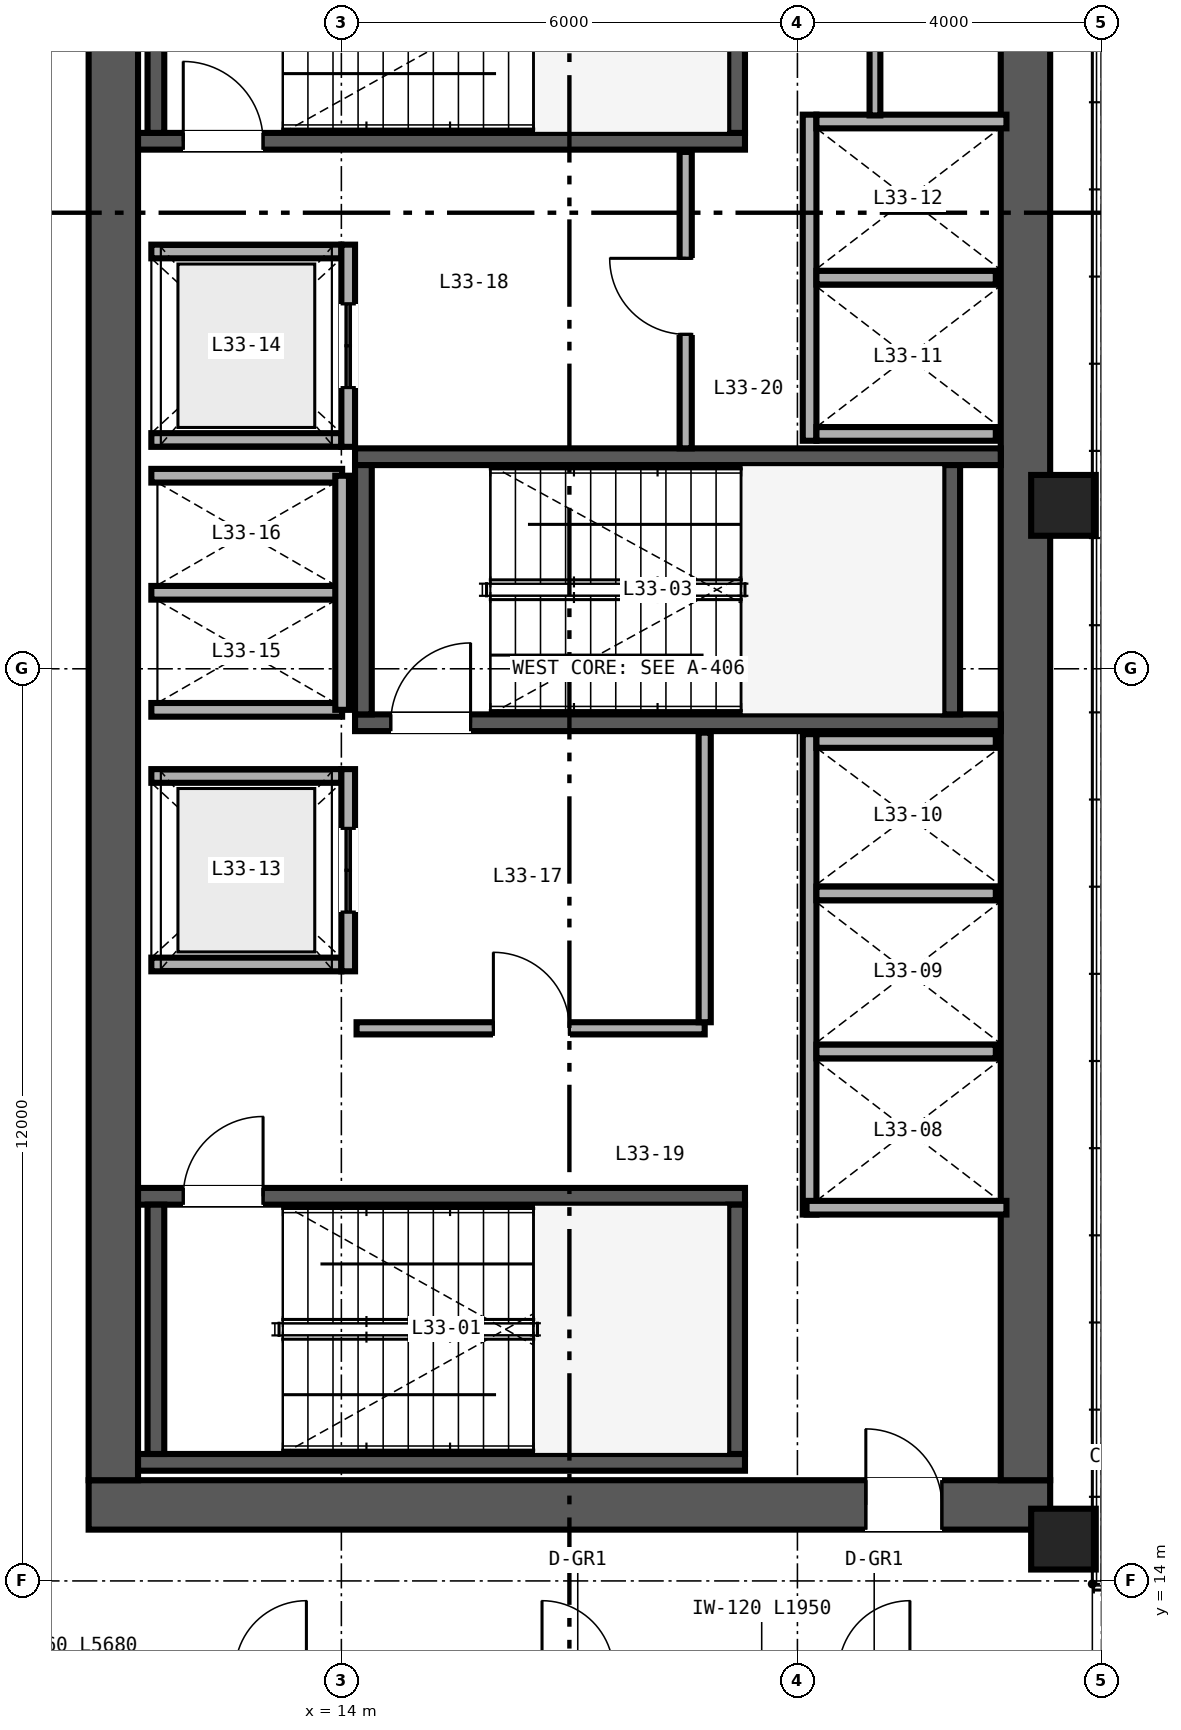
"""IFC4 building model, lengths in metres.
Left out: names, types, materials, properties, quantities, classifications, styles, units other than length and angle.
Written with IfcOpenShell. Run it as: python <this file> out.ifc"""

import sys

from ifc_helpers import new_model, si_unit, direction, frame, frame_2d, origin, origin_2d, place, context, subcontext, project, spatial, rectangle, hollow_rectangle, extrude, source, transform, mapped, element, fill, save


model = new_model("IFC4")
c1 = context("Model", 3, precision=1e-05, world=origin(), true_north=direction((0.0, 1.0)))
c2 = subcontext(c1, "Body", "Model", "MODEL_VIEW")
j1 = project(units=[si_unit("LENGTHUNIT", "METRE"), si_unit("PLANEANGLEUNIT", "RADIAN")], contexts=[c1])
p1 = place(None, origin())
s1 = spatial("IfcSite", under=j1, at=p1, CompositionType="ELEMENT")
p2 = place(p1, origin())
s2 = spatial("IfcBuilding", under=s1, at=p2, CompositionType="ELEMENT")
p3 = place(p2, frame((0.0, 0.0, 133.2)))
s3 = spatial("IfcBuildingStorey", under=s2, at=p3, CompositionType="ELEMENT", Elevation=133.2)
p4 = place(p3, frame((10.675, 15.0, 0.0), z_axis=(0.0, 0.0, 1.0), x_axis=(1.0, 0.0, 0.0)))
e1 = element("IfcWall", 1, at=p4, inside=s3, PredefinedType="SHEAR", context=c2, shape_type="SweptSolid", body=[
    extrude(rectangle(XDim=12.65, YDim=0.65, at=frame_2d((6.325, 0.0))), origin(), (0.0, 0.0, 1.0), 3.36),
])
p5 = place(p4, frame((10.225, 0.0, 0.0)))
e2 = element("IfcOpeningElement", 2, at=p5, cuts=e1, PredefinedType="OPENING", context=c2, shape_type="SweptSolid", body=[
    extrude(rectangle(XDim=1.0, YDim=2.15, at=frame_2d((0.5, 1.075))), frame((0.0, 0.335, 0.0), z_axis=(0.0, -1.0, 0.0), x_axis=(1.0, 0.0, 0.0)), (0.0, 0.0, 1.0), 0.67),
])
for number, where, z_axis, x_axis in (
    (3, (11.0, 15.325, 0.0), (0.0, 0.0, 1.0), (0.0, 1.0, 0.0)),
    (4, (23.0, 15.325, 0.0), (0.0, 0.0, 1.0), (0.0, 1.0, 0.0)),
):
    element("IfcWall", number, at=place(p3, frame(where, z_axis=z_axis, x_axis=x_axis)), inside=s3, PredefinedType="SHEAR", context=c2, shape_type="SweptSolid", body=[
        extrude(rectangle(XDim=21.35, YDim=0.65, at=frame_2d((10.675, 0.0))), origin(), (0.0, 0.0, 1.0), 3.36),
    ])
p6 = place(p3, frame((11.325, 15.56, 0.0), z_axis=(0.0, 0.0, 1.0), x_axis=(1.0, 0.0, 0.0)))
e5 = element("IfcWall", 5, at=p6, inside=s3, PredefinedType="SHEAR", context=c2, shape_type="SweptSolid", body=[
    extrude(rectangle(XDim=7.985, YDim=0.22, at=frame_2d((3.993, 0.0))), origin(), (0.0, 0.0, 1.0), 3.4),
])
p7 = place(p3, frame((11.325, 19.06, 0.0), z_axis=(0.0, 0.0, 1.0), x_axis=(1.0, 0.0, 0.0)))
e6 = element("IfcWall", 6, at=p7, inside=s3, PredefinedType="SHEAR", context=c2, shape_type="SweptSolid", body=[
    extrude(rectangle(XDim=7.985, YDim=0.22, at=frame_2d((3.993, 0.0))), origin(), (0.0, 0.0, 1.0), 3.4),
])
p8 = place(p7, frame((0.595, 0.0, 0.0)))
e7 = element("IfcOpeningElement", 7, at=p8, cuts=e6, PredefinedType="OPENING", context=c2, shape_type="SweptSolid", body=[
    extrude(rectangle(XDim=1.05, YDim=2.15, at=frame_2d((0.525, 1.075))), frame((0.0, 0.12, 0.0), z_axis=(0.0, -1.0, 0.0), x_axis=(1.0, 0.0, 0.0)), (0.0, 0.0, 1.0), 0.24),
])
for number, where, z_axis, x_axis in (
    (8, (11.56, 15.67, 0.0), (0.0, 0.0, 1.0), (0.0, 1.0, 0.0)),
    (9, (19.2, 15.67, 0.0), (0.0, 0.0, 1.0), (0.0, 1.0, 0.0)),
):
    element("IfcWall", number, at=place(p3, frame(where, z_axis=z_axis, x_axis=x_axis)), inside=s3, PredefinedType="SHEAR", context=c2, shape_type="SweptSolid", body=[
        extrude(rectangle(XDim=3.28, YDim=0.22, at=frame_2d((1.64, 0.0))), origin(), (0.0, 0.0, 1.0), 3.4),
    ])
p9 = place(p3, frame((11.325, 32.94, 0.0), z_axis=(0.0, 0.0, 1.0), x_axis=(1.0, 0.0, 0.0)))
e10 = element("IfcWall", 10, at=p9, inside=s3, PredefinedType="SHEAR", context=c2, shape_type="SweptSolid", body=[
    extrude(rectangle(XDim=7.985, YDim=0.22, at=frame_2d((3.993, 0.0))), origin(), (0.0, 0.0, 1.0), 3.4),
])
p10 = place(p9, frame((0.595, 0.0, 0.0)))
e11 = element("IfcOpeningElement", 11, at=p10, cuts=e10, PredefinedType="OPENING", context=c2, shape_type="SweptSolid", body=[
    extrude(rectangle(XDim=1.05, YDim=2.15, at=frame_2d((0.525, 1.075))), frame((0.0, 0.12, 0.0), z_axis=(0.0, -1.0, 0.0), x_axis=(1.0, 0.0, 0.0)), (0.0, 0.0, 1.0), 0.24),
])
for number, where, z_axis, x_axis in (
    (12, (11.56, 33.05, 0.0), (0.0, 0.0, 1.0), (0.0, 1.0, 0.0)),
    (13, (19.2, 33.05, 0.0), (0.0, 0.0, 1.0), (0.0, 1.0, 0.0)),
):
    element("IfcWall", number, at=place(p3, frame(where, z_axis=z_axis, x_axis=x_axis)), inside=s3, PredefinedType="SHEAR", context=c2, shape_type="SweptSolid", body=[
        extrude(rectangle(XDim=3.28, YDim=0.22, at=frame_2d((1.64, 0.0))), origin(), (0.0, 0.0, 1.0), 3.4),
    ])
p11 = place(p3, frame((14.18, 25.29, 0.0), z_axis=(0.0, 0.0, 1.0), x_axis=(1.0, 0.0, 0.0)))
e14 = element("IfcWall", 14, at=p11, inside=s3, PredefinedType="SHEAR", context=c2, shape_type="SweptSolid", body=[
    extrude(rectangle(XDim=8.495, YDim=0.22, at=frame_2d((4.248, 0.0))), origin(), (0.0, 0.0, 1.0), 3.4),
])
p12 = place(p11, frame((0.47, 0.0, 0.0)))
e15 = element("IfcOpeningElement", 15, at=p12, cuts=e14, PredefinedType="OPENING", context=c2, shape_type="SweptSolid", body=[
    extrude(rectangle(XDim=1.05, YDim=2.15, at=frame_2d((0.525, 1.075))), frame((0.0, 0.12, 0.0), z_axis=(0.0, -1.0, 0.0), x_axis=(1.0, 0.0, 0.0)), (0.0, 0.0, 1.0), 0.24),
])
p13 = place(p3, frame((14.18, 28.79, 0.0), z_axis=(0.0, 0.0, 1.0), x_axis=(1.0, 0.0, 0.0)))
e16 = element("IfcWall", 16, at=p13, inside=s3, PredefinedType="SHEAR", context=c2, shape_type="SweptSolid", body=[
    extrude(rectangle(XDim=8.495, YDim=0.22, at=frame_2d((4.248, 0.0))), origin(), (0.0, 0.0, 1.0), 3.4),
])
for number, where, z_axis, x_axis in (
    (17, (14.29, 25.4, 0.0), (0.0, 0.0, 1.0), (0.0, 1.0, 0.0)),
    (18, (22.03, 25.4, 0.0), (0.0, 0.0, 1.0), (0.0, 1.0, 0.0)),
):
    element("IfcWall", number, at=place(p3, frame(where, z_axis=z_axis, x_axis=x_axis)), inside=s3, PredefinedType="SHEAR", context=c2, shape_type="SweptSolid", body=[
        extrude(rectangle(XDim=3.28, YDim=0.22, at=frame_2d((1.64, 0.0))), origin(), (0.0, 0.0, 1.0), 3.4),
    ])
m1 = source(origin(), c2, "Body", "SweptSolid", [
    extrude(hollow_rectangle(XDim=0.85, YDim=0.8, WallThickness=0.032, at=origin_2d()), origin(), (0.0, 0.0, 1.0), 3.36),
])
for number, where, z_axis, x_axis in (
    (19, (23.5, 14.55, 0.0), (0.0, 0.0, 1.0), (1.0, 0.0, 0.0)),
    (20, (23.5, 28.15, 0.0), (0.0, 0.0, 1.0), (1.0, 0.0, 0.0)),
):
    element("IfcColumn", number, at=place(p3, frame(where, z_axis=z_axis, x_axis=x_axis)), inside=s3, PredefinedType="COLUMN", context=c2, shape_type="MappedRepresentation", body=[
        mapped(m1, transform((0.0, 0.0, 0.0), scale=1.0)),
    ])
p14 = place(p3, frame((20.16, 18.82, 0.0), z_axis=(0.0, 0.0, 1.0), x_axis=(0.0, 1.0, 0.0)))
e21 = element("IfcWall", 21, at=p14, inside=s3, PredefinedType="SOLIDWALL", context=c2, shape_type="SweptSolid", body=[
    extrude(rectangle(XDim=6.32, YDim=0.18, at=frame_2d((3.16, 0.0))), origin(), (0.0, 0.0, 1.0), 2.36),
])
p15 = place(p3, frame((20.12, 18.91, 0.0), z_axis=(0.0, 0.0, 1.0), x_axis=(1.0, 0.0, 0.0)))
e22 = element("IfcWall", 22, at=p15, inside=s3, PredefinedType="SOLIDWALL", context=c2, shape_type="SweptSolid", body=[
    extrude(rectangle(XDim=2.63, YDim=0.18, at=frame_2d((1.315, 0.0))), origin(), (0.0, 0.0, 1.0), 3.36),
])
p16 = place(p3, frame((20.25, 25.05, 0.0), z_axis=(0.0, 0.0, 1.0), x_axis=(1.0, 0.0, 0.0)))
e23 = element("IfcWall", 23, at=p16, inside=s3, PredefinedType="SOLIDWALL", context=c2, shape_type="SweptSolid", body=[
    extrude(rectangle(XDim=2.36, YDim=0.18, at=frame_2d((1.18, 0.0))), origin(), (0.0, 0.0, 1.0), 3.36),
])
p17 = place(p3, frame((20.25, 20.965, 0.0), z_axis=(0.0, 0.0, 1.0), x_axis=(1.0, 0.0, 0.0)))
e24 = element("IfcWall", 24, at=p17, inside=s3, PredefinedType="SOLIDWALL", context=c2, shape_type="SweptSolid", body=[
    extrude(rectangle(XDim=2.36, YDim=0.18, at=frame_2d((1.18, 0.0))), origin(), (0.0, 0.0, 1.0), 2.36),
])
p18 = place(p3, frame((20.25, 23.045, 0.0), z_axis=(0.0, 0.0, 1.0), x_axis=(1.0, 0.0, 0.0)))
e25 = element("IfcWall", 25, at=p18, inside=s3, PredefinedType="SOLIDWALL", context=c2, shape_type="SweptSolid", body=[
    extrude(rectangle(XDim=2.36, YDim=0.18, at=frame_2d((1.18, 0.0))), origin(), (0.0, 0.0, 1.0), 3.36),
])
p19 = place(p3, frame((20.16, 29.0, 0.0), z_axis=(0.0, 0.0, 1.0), x_axis=(0.0, 1.0, 0.0)))
e26 = element("IfcWall", 26, at=p19, inside=s3, PredefinedType="SOLIDWALL", context=c2, shape_type="SweptSolid", body=[
    extrude(rectangle(XDim=4.29, YDim=0.18, at=frame_2d((2.145, 0.0))), origin(), (0.0, 0.0, 1.0), 3.36),
])
p20 = place(p3, frame((20.25, 29.09, 0.0), z_axis=(0.0, 0.0, 1.0), x_axis=(1.0, 0.0, 0.0)))
e27 = element("IfcWall", 27, at=p20, inside=s3, PredefinedType="SOLIDWALL", context=c2, shape_type="SweptSolid", body=[
    extrude(rectangle(XDim=2.36, YDim=0.18, at=frame_2d((1.18, 0.0))), origin(), (0.0, 0.0, 1.0), 3.36),
])
p21 = place(p3, frame((20.25, 33.2, 0.0), z_axis=(0.0, 0.0, 1.0), x_axis=(1.0, 0.0, 0.0)))
e28 = element("IfcWall", 28, at=p21, inside=s3, PredefinedType="SOLIDWALL", context=c2, shape_type="SweptSolid", body=[
    extrude(rectangle(XDim=2.5, YDim=0.18, at=frame_2d((1.25, 0.0))), origin(), (0.0, 0.0, 1.0), 3.36),
])
p22 = place(p3, frame((20.25, 31.145, 0.0), z_axis=(0.0, 0.0, 1.0), x_axis=(1.0, 0.0, 0.0)))
e29 = element("IfcWall", 29, at=p22, inside=s3, PredefinedType="SOLIDWALL", context=c2, shape_type="SweptSolid", body=[
    extrude(rectangle(XDim=2.36, YDim=0.18, at=frame_2d((1.18, 0.0))), origin(), (0.0, 0.0, 1.0), 3.36),
])
for number, where, z_axis, x_axis in (
    (30, (11.5, 22.11, 0.0), (0.0, 0.0, 1.0), (1.0, 0.0, 0.0)),
    (31, (11.5, 24.59, 0.0), (0.0, 0.0, 1.0), (1.0, 0.0, 0.0)),
):
    element("IfcWall", number, at=place(p3, frame(where, z_axis=z_axis, x_axis=x_axis)), inside=s3, PredefinedType="SOLIDWALL", context=c2, shape_type="SweptSolid", body=[
        extrude(rectangle(XDim=2.5, YDim=0.18, at=frame_2d((1.25, 0.0))), origin(), (0.0, 0.0, 1.0), 3.36),
    ])
p23 = place(p3, frame((14.09, 22.02, 0.0), z_axis=(0.0, 0.0, 1.0), x_axis=(0.0, 1.0, 0.0)))
e32 = element("IfcWall", 32, at=p23, inside=s3, PredefinedType="SOLIDWALL", context=c2, shape_type="SweptSolid", body=[
    extrude(rectangle(XDim=2.66, YDim=0.18, at=frame_2d((1.33, 0.0))), origin(), (0.0, 0.0, 1.0), 3.36),
])
p24 = place(p23, frame((0.78, 0.0, 0.0)))
e33 = element("IfcOpeningElement", 33, at=p24, cuts=e32, PredefinedType="OPENING", context=c2, shape_type="SweptSolid", body=[
    extrude(rectangle(XDim=1.1, YDim=2.2, at=frame_2d((0.55, 1.1))), frame((0.0, 0.1, 0.0), z_axis=(0.0, -1.0, 0.0), x_axis=(1.0, 0.0, 0.0)), (0.0, 0.0, 1.0), 0.2),
])
for number, where, z_axis, x_axis in (
    (34, (11.5, 29.01, 0.0), (0.0, 0.0, 1.0), (1.0, 0.0, 0.0)),
    (35, (11.5, 31.49, 0.0), (0.0, 0.0, 1.0), (1.0, 0.0, 0.0)),
):
    element("IfcWall", number, at=place(p3, frame(where, z_axis=z_axis, x_axis=x_axis)), inside=s3, PredefinedType="SOLIDWALL", context=c2, shape_type="SweptSolid", body=[
        extrude(rectangle(XDim=2.5, YDim=0.18, at=frame_2d((1.25, 0.0))), origin(), (0.0, 0.0, 1.0), 3.36),
    ])
p25 = place(p3, frame((14.09, 28.92, 0.0), z_axis=(0.0, 0.0, 1.0), x_axis=(0.0, 1.0, 0.0)))
e36 = element("IfcWall", 36, at=p25, inside=s3, PredefinedType="SOLIDWALL", context=c2, shape_type="SweptSolid", body=[
    extrude(rectangle(XDim=2.66, YDim=0.18, at=frame_2d((1.33, 0.0))), origin(), (0.0, 0.0, 1.0), 3.36),
])
p26 = place(p25, frame((0.78, 0.0, 0.0)))
e37 = element("IfcOpeningElement", 37, at=p26, cuts=e36, PredefinedType="OPENING", context=c2, shape_type="SweptSolid", body=[
    extrude(rectangle(XDim=1.1, YDim=2.2, at=frame_2d((0.55, 1.1))), frame((0.0, 0.1, 0.0), z_axis=(0.0, -1.0, 0.0), x_axis=(1.0, 0.0, 0.0)), (0.0, 0.0, 1.0), 0.2),
])
for number, where, z_axis, x_axis in (
    (38, (11.5, 25.46, 0.0), (0.0, 0.0, 1.0), (1.0, 0.0, 0.0)),
    (39, (11.5, 27.0, 0.0), (0.0, 0.0, 1.0), (1.0, 0.0, 0.0)),
    (40, (11.5, 28.54, 0.0), (0.0, 0.0, 1.0), (1.0, 0.0, 0.0)),
):
    element("IfcWall", number, at=place(p3, frame(where, z_axis=z_axis, x_axis=x_axis)), inside=s3, PredefinedType="SOLIDWALL", context=c2, shape_type="SweptSolid", body=[
        extrude(rectangle(XDim=2.51, YDim=0.18, at=frame_2d((1.255, 0.0))), origin(), (0.0, 0.0, 1.0), 3.36),
    ])
p27 = place(p3, frame((14.01, 25.46, 0.0), z_axis=(0.0, 0.0, 1.0), x_axis=(0.0, 1.0, 0.0)))
e41 = element("IfcWall", 41, at=p27, inside=s3, PredefinedType="SOLIDWALL", context=c2, shape_type="SweptSolid", body=[
    extrude(rectangle(XDim=3.08, YDim=0.18, at=frame_2d((1.54, 0.0))), origin(), (0.0, 0.0, 1.0), 3.36),
])
p28 = place(p3, frame((14.2, 21.27, 0.0), z_axis=(0.0, 0.0, 1.0), x_axis=(1.0, 0.0, 0.0)))
e42 = element("IfcWall", 42, at=p28, inside=s3, PredefinedType="PARTITIONING", context=c2, shape_type="SweptSolid", body=[
    extrude(rectangle(XDim=4.58, YDim=0.16, at=frame_2d((2.29, 0.0))), origin(), (0.0, 0.0, 1.0), 3.36),
])
p29 = place(p28, frame((1.8, 0.0, 0.0)))
e43 = element("IfcOpeningElement", 43, at=p29, cuts=e42, PredefinedType="OPENING", context=c2, shape_type="SweptSolid", body=[
    extrude(rectangle(XDim=1.0, YDim=2.15, at=frame_2d((0.5, 1.075))), frame((0.0, 0.09, 0.0), z_axis=(0.0, -1.0, 0.0), x_axis=(1.0, 0.0, 0.0)), (0.0, 0.0, 1.0), 0.18),
])
p30 = place(p3, frame((18.78, 21.35, 0.0), z_axis=(0.0, 0.0, 1.0), x_axis=(0.0, 1.0, 0.0)))
e44 = element("IfcWall", 44, at=p30, inside=s3, PredefinedType="PARTITIONING", context=c2, shape_type="SweptSolid", body=[
    extrude(rectangle(XDim=3.81, YDim=0.16, at=frame_2d((1.905, 0.0))), origin(), (0.0, 0.0, 1.0), 3.36),
])
p31 = place(p3, frame((18.53, 28.9, 0.0), z_axis=(0.0, 0.0, 1.0), x_axis=(0.0, 1.0, 0.0)))
e45 = element("IfcWall", 45, at=p31, inside=s3, PredefinedType="PARTITIONING", context=c2, shape_type="SweptSolid", body=[
    extrude(rectangle(XDim=3.9, YDim=0.16, at=frame_2d((1.95, 0.0))), origin(), (0.0, 0.0, 1.0), 3.36),
])
p32 = place(p31, frame((1.5, 0.0, 0.0)))
e46 = element("IfcOpeningElement", 46, at=p32, cuts=e45, PredefinedType="OPENING", context=c2, shape_type="SweptSolid", body=[
    extrude(rectangle(XDim=1.0, YDim=2.15, at=frame_2d((0.5, 1.075))), frame((0.0, 0.09, 0.0), z_axis=(0.0, -1.0, 0.0), x_axis=(1.0, 0.0, 0.0)), (0.0, 0.0, 1.0), 0.18),
])
p33 = place(p3, frame((21.02, 33.28, 0.0), z_axis=(0.0, 0.0, 1.0), x_axis=(0.0, 1.0, 0.0)))
e47 = element("IfcWall", 47, at=p33, inside=s3, PredefinedType="PARTITIONING", context=c2, shape_type="SweptSolid", body=[
    extrude(rectangle(XDim=3.47, YDim=0.142, at=frame_2d((1.735, 0.0))), origin(), (0.0, 0.0, 1.0), 3.36),
])
p34 = place(p33, frame((1.15, 0.0, 0.0)))
e48 = element("IfcOpeningElement", 48, at=p34, cuts=e47, PredefinedType="OPENING", context=c2, shape_type="SweptSolid", body=[
    extrude(rectangle(XDim=0.84, YDim=2.1, at=frame_2d((0.42, 1.05))), frame((0.0, 0.081, 0.0), z_axis=(0.0, -1.0, 0.0), x_axis=(1.0, 0.0, 0.0)), (0.0, 0.0, 1.0), 0.162),
])
m2 = source(origin(), c2, "Body", "SweptSolid", [
    extrude(rectangle(XDim=1.05, YDim=2.15, at=frame_2d((0.525, 1.075))), frame((0.0, 0.025, 0.0), z_axis=(0.0, -1.0, 0.0), x_axis=(1.0, 0.0, 0.0)), (0.0, 0.0, 1.0), 0.05),
])
p35 = place(p8, origin())
e49 = element("IfcDoor", 49, at=p35, inside=s3, OperationType="SINGLE_SWING_RIGHT", PredefinedType="DOOR", context=c2, shape_type="MappedRepresentation", body=[
    mapped(m2, transform((0.0, 0.0, 0.0), scale=1.0)),
])
fill(e7, e49)
p36 = place(p10, origin())
e50 = element("IfcDoor", 50, at=p36, inside=s3, OperationType="SINGLE_SWING_LEFT", PredefinedType="DOOR", context=c2, shape_type="MappedRepresentation", body=[
    mapped(m2, transform((0.0, 0.0, 0.0), scale=1.0)),
])
fill(e11, e50)
p37 = place(p12, origin())
e51 = element("IfcDoor", 51, at=p37, inside=s3, OperationType="SINGLE_SWING_RIGHT", PredefinedType="DOOR", context=c2, shape_type="MappedRepresentation", body=[
    mapped(m2, transform((0.0, 0.0, 0.0), scale=1.0)),
])
fill(e15, e51)
m3 = source(origin(), c2, "Body", "SweptSolid", [
    extrude(rectangle(XDim=1.1, YDim=2.2, at=frame_2d((0.55, 1.1))), frame((0.0, 0.025, 0.0), z_axis=(0.0, -1.0, 0.0), x_axis=(1.0, 0.0, 0.0)), (0.0, 0.0, 1.0), 0.05),
])
p38 = place(p24, origin())
e52 = element("IfcDoor", 52, at=p38, inside=s3, OperationType="DOUBLE_DOOR_SLIDING", PredefinedType="DOOR", context=c2, shape_type="MappedRepresentation", body=[
    mapped(m3, transform((0.0, 0.0, 0.0), scale=1.0)),
])
fill(e33, e52)
p39 = place(p26, origin())
e53 = element("IfcDoor", 53, at=p39, inside=s3, OperationType="DOUBLE_DOOR_SLIDING", PredefinedType="DOOR", context=c2, shape_type="MappedRepresentation", body=[
    mapped(m3, transform((0.0, 0.0, 0.0), scale=1.0)),
])
fill(e37, e53)
m4 = source(origin(), c2, "Body", "SweptSolid", [
    extrude(rectangle(XDim=1.0, YDim=2.15, at=frame_2d((0.5, 1.075))), frame((0.0, 0.025, 0.0), z_axis=(0.0, -1.0, 0.0), x_axis=(1.0, 0.0, 0.0)), (0.0, 0.0, 1.0), 0.05),
])
p40 = place(p29, origin())
e54 = element("IfcDoor", 54, at=p40, inside=s3, OperationType="SINGLE_SWING_LEFT", PredefinedType="DOOR", context=c2, shape_type="MappedRepresentation", body=[
    mapped(m4, transform((0.0, 0.0, 0.0), scale=1.0)),
])
fill(e43, e54)
p41 = place(p32, origin())
e55 = element("IfcDoor", 55, at=p41, inside=s3, OperationType="SINGLE_SWING_RIGHT", PredefinedType="DOOR", context=c2, shape_type="MappedRepresentation", body=[
    mapped(m4, transform((0.0, 0.0, 0.0), scale=1.0)),
])
fill(e46, e55)
p42 = place(p5, origin())
e56 = element("IfcDoor", 56, at=p42, inside=s3, OperationType="SINGLE_SWING_LEFT", PredefinedType="DOOR", context=c2, shape_type="MappedRepresentation", body=[
    mapped(m4, transform((0.0, 0.0, 0.0), scale=1.0)),
])
fill(e2, e56)
save(model, sys.argv[1])
